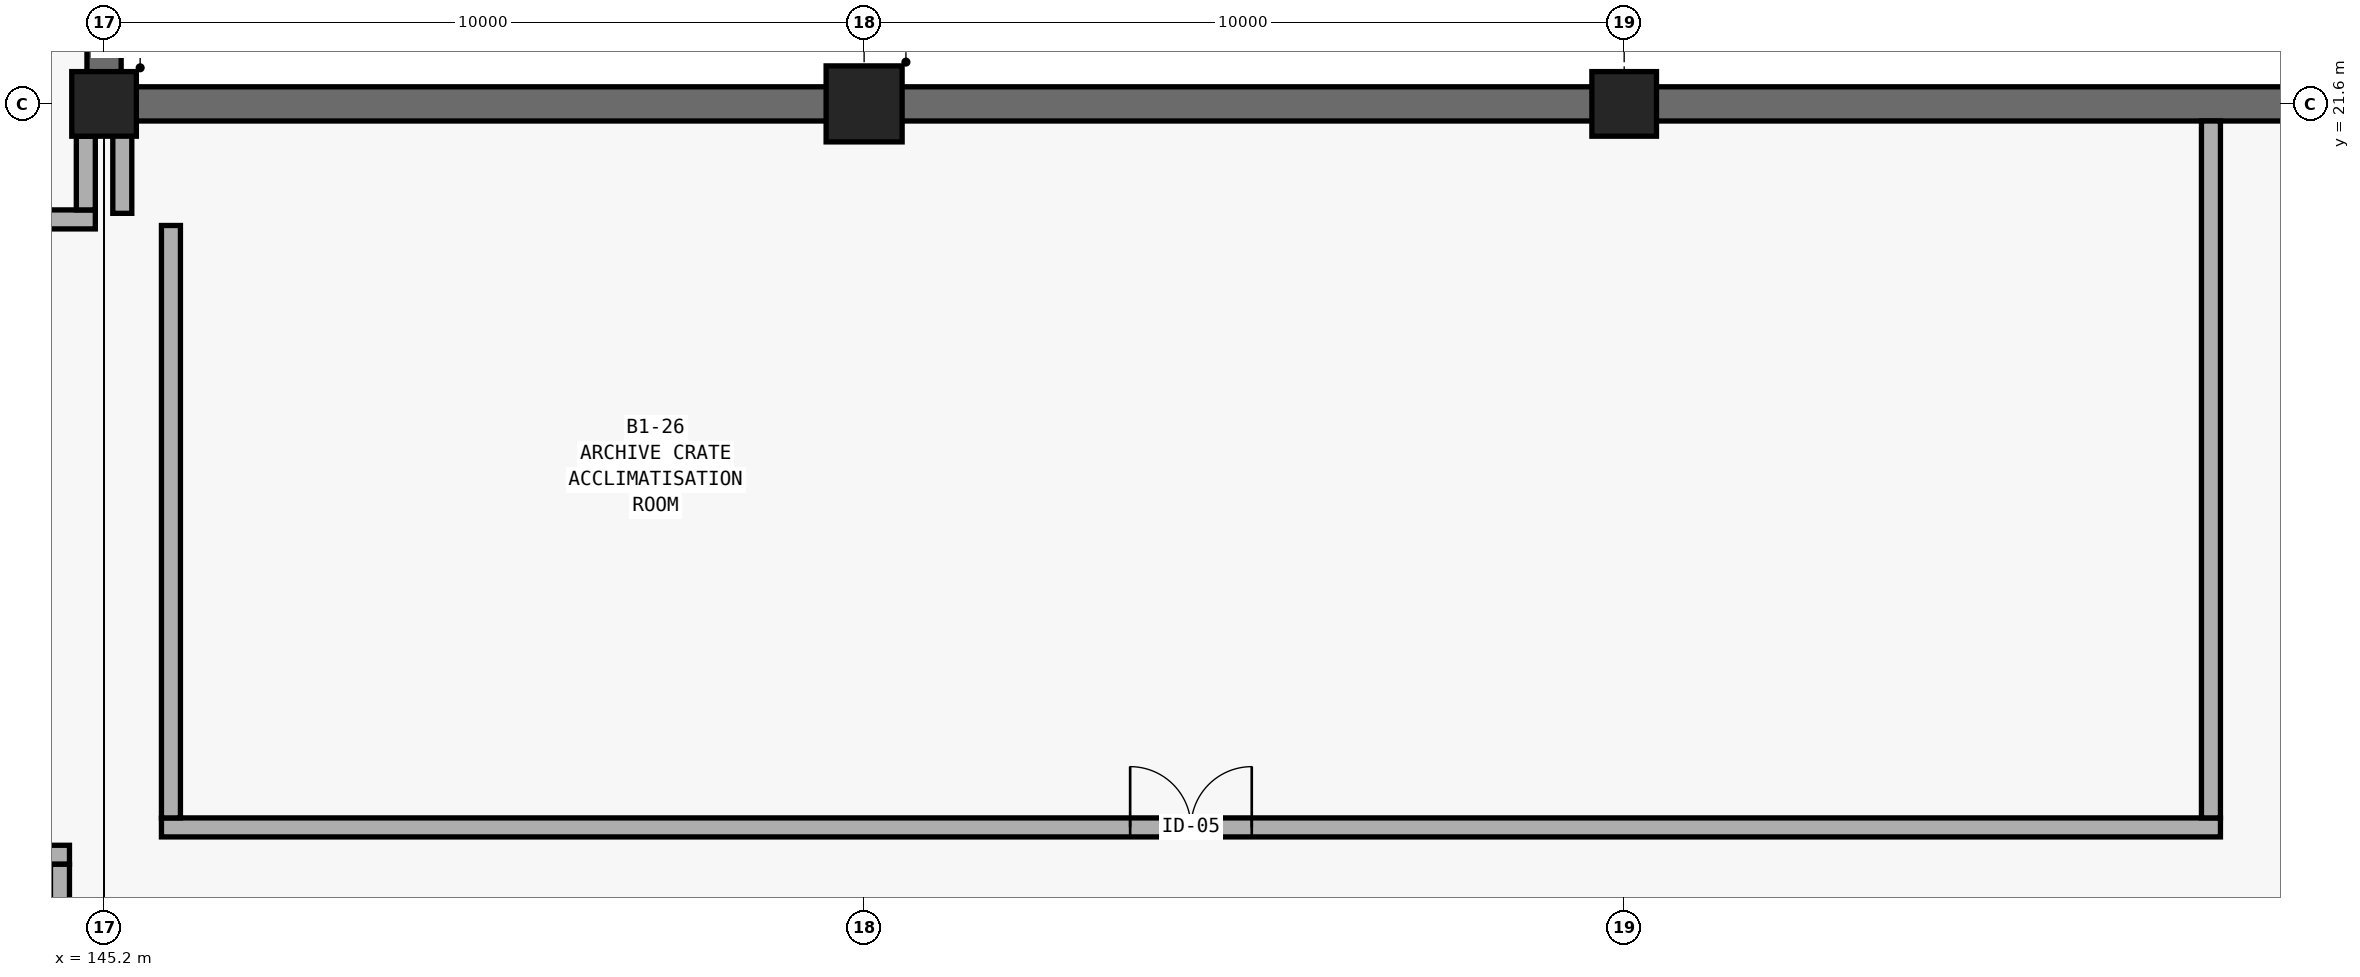
"""IFC4 building model, lengths in metres.
Left out: names, types, materials, properties, quantities, classifications, styles, units other than length and angle.
Written with IfcOpenShell. Run it as: python <this file> out.ifc"""

import sys

from ifc_helpers import new_model, si_unit, direction, frame, frame_2d, origin, origin_2d, place, context, subcontext, project, spatial, rectangle, extrude, element, fill, save


model = new_model("IFC4")
c1 = context("Model", 3, precision=1e-05, world=origin(), true_north=direction((0.0, 1.0)))
c2 = subcontext(c1, "Body", "Model", "MODEL_VIEW")
j1 = project(units=[si_unit("LENGTHUNIT", "METRE"), si_unit("PLANEANGLEUNIT", "RADIAN")], contexts=[c1])
p1 = place(None, origin())
s1 = spatial("IfcSite", under=j1, at=p1, CompositionType="ELEMENT")
p2 = place(p1, origin())
s2 = spatial("IfcBuilding", under=s1, at=p2, CompositionType="ELEMENT")
p3 = place(p2, frame((0.0, 0.0, -4.8)))
s3 = spatial("IfcBuildingStorey", under=s2, at=p3, CompositionType="ELEMENT", Elevation=-4.8)
p4 = place(p3, frame((145.2, 21.6, 0.0), z_axis=(0.0, 0.0, 1.0), x_axis=(1.0, 0.0, 0.0)))
e1 = element("IfcColumn", 1, at=p4, inside=s3, PredefinedType="COLUMN", context=c2, shape_type="SweptSolid", body=[
    extrude(rectangle(XDim=0.85, YDim=0.85, at=origin_2d()), origin(), (0.0, 0.0, 1.0), 4.8),
])
p5 = place(p3, frame((155.2, 21.6, 0.0), z_axis=(0.0, 0.0, 1.0), x_axis=(1.0, 0.0, 0.0)))
e2 = element("IfcColumn", 2, at=p5, inside=s3, PredefinedType="COLUMN", context=c2, shape_type="SweptSolid", body=[
    extrude(rectangle(XDim=1.0, YDim=1.0, at=origin_2d()), origin(), (0.0, 0.0, 1.0), 4.8),
])
p6 = place(p3, frame((165.2, 21.6, 0.0), z_axis=(0.0, 0.0, 1.0), x_axis=(1.0, 0.0, 0.0)))
e3 = element("IfcColumn", 3, at=p6, inside=s3, PredefinedType="COLUMN", context=c2, shape_type="SweptSolid", body=[
    extrude(rectangle(XDim=0.85, YDim=0.85, at=origin_2d()), origin(), (0.0, 0.0, 1.0), 4.8),
])
for number, where, z_axis, x_axis in (
    (4, (175.2, 21.6, 0.0), (0.0, 0.0, 1.0), (-1.0, 0.0, 0.0)),
    (5, (165.2, 21.6, 0.0), (0.0, 0.0, 1.0), (-1.0, 0.0, 0.0)),
    (6, (155.2, 21.6, 0.0), (0.0, 0.0, 1.0), (-1.0, 0.0, 0.0)),
):
    element("IfcWall", number, at=place(p3, frame(where, z_axis=z_axis, x_axis=x_axis)), inside=s3, PredefinedType="SHEAR", context=c2, shape_type="SweptSolid", body=[
        extrude(rectangle(XDim=10.0, YDim=0.45, at=frame_2d((5.0, 0.0))), origin(), (0.0, 0.0, 1.0), 4.8),
    ])
p7 = place(p3, frame((145.2, 21.6, 0.0), z_axis=(0.0, 0.0, 1.0), x_axis=(0.0, 1.0, 0.0)))
e7 = element("IfcWall", 7, at=p7, inside=s3, PredefinedType="SHEAR", context=c2, shape_type="SweptSolid", body=[
    extrude(rectangle(XDim=8.4, YDim=0.45, at=frame_2d((4.2, 0.0))), origin(), (0.0, 0.0, 1.0), 4.8),
])
p8 = place(p3, frame((141.395, 11.72, 0.0), z_axis=(0.0, 0.0, 1.0), x_axis=(1.0, 0.0, 0.0)))
e8 = element("IfcWall", 8, at=p8, inside=s3, PredefinedType="PARTITIONING", context=c2, shape_type="SweptSolid", body=[
    extrude(rectangle(XDim=3.35, YDim=0.25, at=frame_2d((1.675, 0.0))), origin(), (0.0, 0.0, 1.0), 3.26),
])
p9 = place(p3, frame((145.955, 12.08, 0.0), z_axis=(0.0, 0.0, 1.0), x_axis=(1.0, 0.0, 0.0)))
e9 = element("IfcWall", 9, at=p9, inside=s3, PredefinedType="PARTITIONING", context=c2, shape_type="SweptSolid", body=[
    extrude(rectangle(XDim=27.09, YDim=0.25, at=frame_2d((13.545, 0.0))), origin(), (0.0, 0.0, 1.0), 3.26),
])
p10 = place(p9, frame((12.745, 0.0, 0.0)))
e10 = element("IfcOpeningElement", 10, at=p10, cuts=e9, PredefinedType="OPENING", context=c2, shape_type="SweptSolid", body=[
    extrude(rectangle(XDim=1.6, YDim=2.3, at=frame_2d((0.8, 1.15))), frame((0.0, 0.14, 0.0), z_axis=(0.0, -1.0, 0.0), x_axis=(1.0, 0.0, 0.0)), (0.0, 0.0, 1.0), 0.28),
])
p11 = place(p3, frame((141.395, 20.08, 0.0), z_axis=(0.0, 0.0, 1.0), x_axis=(1.0, 0.0, 0.0)))
e11 = element("IfcWall", 11, at=p11, inside=s3, PredefinedType="PARTITIONING", context=c2, shape_type="SweptSolid", body=[
    extrude(rectangle(XDim=3.69, YDim=0.25, at=frame_2d((1.845, 0.0))), origin(), (0.0, 0.0, 1.0), 3.26),
])
p12 = place(p3, frame((144.62, 9.825, 0.0), z_axis=(0.0, 0.0, 1.0), x_axis=(0.0, 1.0, 0.0)))
e12 = element("IfcWall", 12, at=p12, inside=s3, PredefinedType="PARTITIONING", context=c2, shape_type="SweptSolid", body=[
    extrude(rectangle(XDim=1.77, YDim=0.25, at=frame_2d((0.885, 0.0))), origin(), (0.0, 0.0, 1.0), 3.26),
])
p13 = place(p3, frame((144.96, 20.205, 0.0), z_axis=(0.0, 0.0, 1.0), x_axis=(0.0, 1.0, 0.0)))
e13 = element("IfcWall", 13, at=p13, inside=s3, PredefinedType="PARTITIONING", context=c2, shape_type="SweptSolid", body=[
    extrude(rectangle(XDim=0.97, YDim=0.25, at=frame_2d((0.485, 0.0))), origin(), (0.0, 0.0, 1.0), 3.26),
])
p14 = place(p3, frame((145.44, 20.16, 0.0), z_axis=(0.0, 0.0, 1.0), x_axis=(0.0, 1.0, 0.0)))
e14 = element("IfcWall", 14, at=p14, inside=s3, PredefinedType="PARTITIONING", context=c2, shape_type="SweptSolid", body=[
    extrude(rectangle(XDim=1.215, YDim=0.25, at=frame_2d((0.607, 0.0))), origin(), (0.0, 0.0, 1.0), 3.26),
])
p15 = place(p3, frame((146.08, 12.205, 0.0), z_axis=(0.0, 0.0, 1.0), x_axis=(0.0, 1.0, 0.0)))
e15 = element("IfcWall", 15, at=p15, inside=s3, PredefinedType="PARTITIONING", context=c2, shape_type="SweptSolid", body=[
    extrude(rectangle(XDim=7.795, YDim=0.25, at=frame_2d((3.897, 0.0))), origin(), (0.0, 0.0, 1.0), 3.26),
])
p16 = place(p3, frame((172.92, 12.205, 0.0), z_axis=(0.0, 0.0, 1.0), x_axis=(0.0, 1.0, 0.0)))
e16 = element("IfcWall", 16, at=p16, inside=s3, PredefinedType="PARTITIONING", context=c2, shape_type="SweptSolid", body=[
    extrude(rectangle(XDim=9.17, YDim=0.25, at=frame_2d((4.585, 0.0))), origin(), (0.0, 0.0, 1.0), 3.26),
])
p17 = place(p10, origin())
e17 = element("IfcDoor", 17, at=p17, inside=s3, OperationType="DOUBLE_DOOR_SINGLE_SWING", PredefinedType="DOOR", context=c2, shape_type="SweptSolid", body=[
    extrude(rectangle(XDim=1.6, YDim=2.3, at=frame_2d((0.8, 1.15))), frame((0.0, 0.025, 0.0), z_axis=(0.0, -1.0, 0.0), x_axis=(1.0, 0.0, 0.0)), (0.0, 0.0, 1.0), 0.05),
])
fill(e10, e17)
save(model, sys.argv[1])
